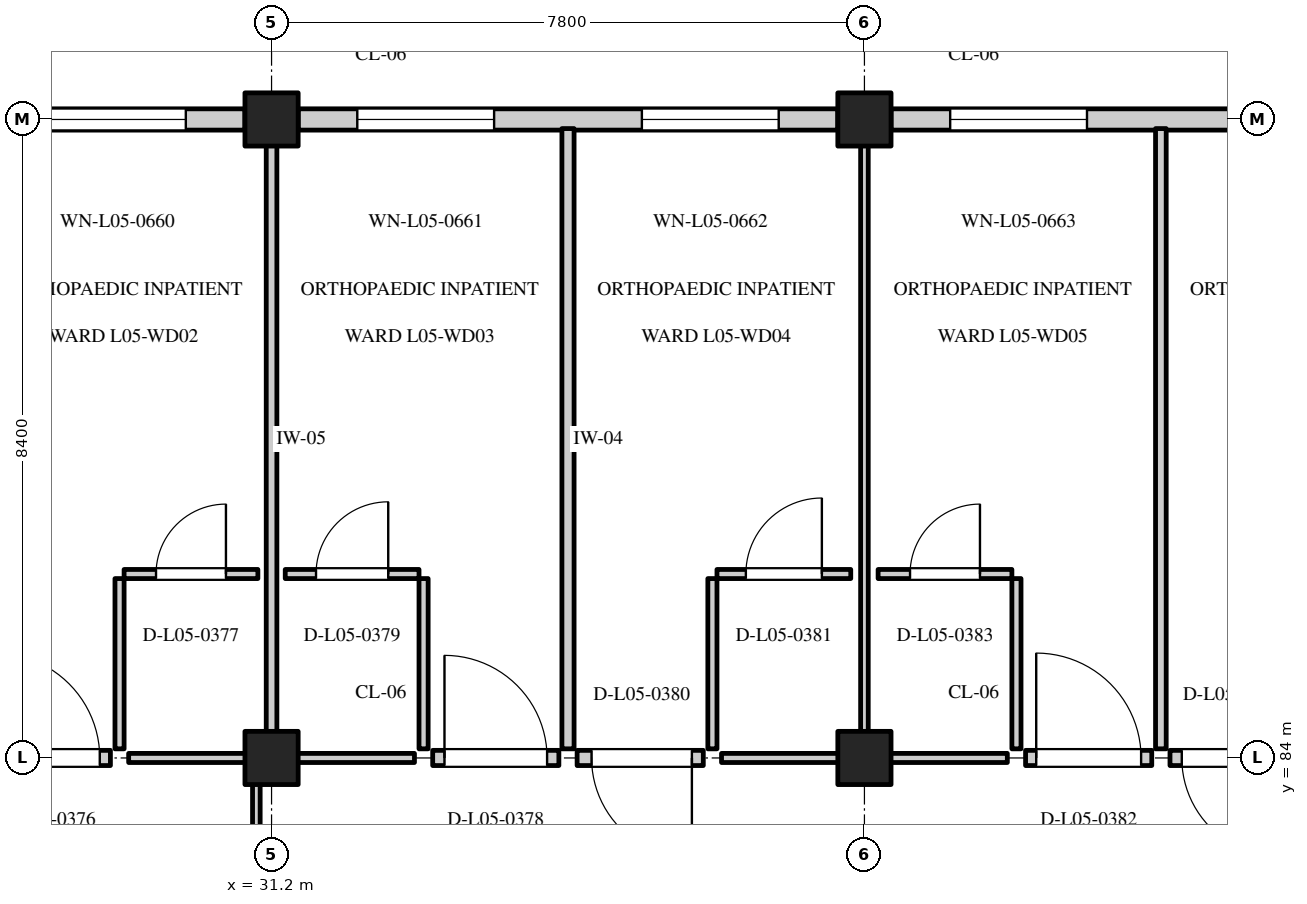
"""IFC4 building model, lengths in metres.
Left out: names, types, materials, properties, quantities, classifications, styles, units other than length and angle.
Written with IfcOpenShell. Run it as: python <this file> out.ifc"""

import sys

from ifc_helpers import new_model, si_unit, direction, frame, frame_2d, origin, origin_2d, place, context, subcontext, project, spatial, rectangle, extrude, element, fill, save


model = new_model("IFC4")
c1 = context("Model", 3, precision=1e-05, world=origin(), true_north=direction((0.0, 1.0)))
c2 = subcontext(c1, "Body", "Model", "MODEL_VIEW")
j1 = project(units=[si_unit("LENGTHUNIT", "METRE"), si_unit("PLANEANGLEUNIT", "RADIAN")], contexts=[c1])
p1 = place(None, origin())
s1 = spatial("IfcSite", under=j1, at=p1, CompositionType="ELEMENT")
p2 = place(p1, origin())
s2 = spatial("IfcBuilding", under=s1, at=p2, CompositionType="ELEMENT")
p3 = place(p2, frame((0.0, 0.0, 22.2)))
s3 = spatial("IfcBuildingStorey", under=s2, at=p3, CompositionType="ELEMENT", Elevation=22.2)
for number, where, z_axis, x_axis in (
    (1, (31.2, 84.0, 0.0), (0.0, 0.0, 1.0), (1.0, 0.0, 0.0)),
    (2, (31.2, 92.4, 0.0), (0.0, 0.0, 1.0), (1.0, 0.0, 0.0)),
    (3, (39.0, 84.0, 0.0), (0.0, 0.0, 1.0), (1.0, 0.0, 0.0)),
    (4, (39.0, 92.4, 0.0), (0.0, 0.0, 1.0), (1.0, 0.0, 0.0)),
):
    element("IfcColumn", number, at=place(p3, frame(where, z_axis=z_axis, x_axis=x_axis)), inside=s3, PredefinedType="COLUMN", context=c2, shape_type="SweptSolid", body=[
        extrude(rectangle(XDim=0.7, YDim=0.7, at=origin_2d()), origin(), (0.0, 0.0, 1.0), 3.9),
    ])
p4 = place(p3, frame((23.775, 92.4, 0.0), z_axis=(0.0, 0.0, 1.0), x_axis=(1.0, 0.0, 0.0)))
e5 = element("IfcWall", 5, at=p4, inside=s3, PredefinedType="STANDARD", context=c2, shape_type="SweptSolid", body=[
    extrude(rectangle(XDim=7.075, YDim=0.28, at=frame_2d((3.538, 0.0))), origin(), (0.0, 0.0, 1.0), 3.05),
])
p5 = place(p4, frame((0.753, 0.0, 0.8)))
e6 = element("IfcOpeningElement", 6, at=p5, cuts=e5, PredefinedType="OPENING", context=c2, shape_type="SweptSolid", body=[
    extrude(rectangle(XDim=1.8, YDim=1.75, at=frame_2d((0.9, 0.875))), frame((0.0, 0.152, 0.0), z_axis=(0.0, -1.0, 0.0), x_axis=(1.0, 0.0, 0.0)), (0.0, 0.0, 1.0), 0.304),
])
p6 = place(p4, frame((4.497, 0.0, 0.8)))
e7 = element("IfcOpeningElement", 7, at=p6, cuts=e5, PredefinedType="OPENING", context=c2, shape_type="SweptSolid", body=[
    extrude(rectangle(XDim=1.8, YDim=1.75, at=frame_2d((0.9, 0.875))), frame((0.0, 0.152, 0.0), z_axis=(0.0, -1.0, 0.0), x_axis=(1.0, 0.0, 0.0)), (0.0, 0.0, 1.0), 0.304),
])
p7 = place(p3, frame((31.55, 92.4, 0.0), z_axis=(0.0, 0.0, 1.0), x_axis=(1.0, 0.0, 0.0)))
e8 = element("IfcWall", 8, at=p7, inside=s3, PredefinedType="STANDARD", context=c2, shape_type="SweptSolid", body=[
    extrude(rectangle(XDim=7.1, YDim=0.28, at=frame_2d((3.55, 0.0))), origin(), (0.0, 0.0, 1.0), 3.05),
])
p8 = place(p7, frame((0.778, 0.0, 0.8)))
e9 = element("IfcOpeningElement", 9, at=p8, cuts=e8, PredefinedType="OPENING", context=c2, shape_type="SweptSolid", body=[
    extrude(rectangle(XDim=1.8, YDim=1.65, at=frame_2d((0.9, 0.825))), frame((0.0, 0.152, 0.0), z_axis=(0.0, -1.0, 0.0), x_axis=(1.0, 0.0, 0.0)), (0.0, 0.0, 1.0), 0.304),
])
p9 = place(p7, frame((4.522, 0.0, 0.8)))
e10 = element("IfcOpeningElement", 10, at=p9, cuts=e8, PredefinedType="OPENING", context=c2, shape_type="SweptSolid", body=[
    extrude(rectangle(XDim=1.8, YDim=1.65, at=frame_2d((0.9, 0.825))), frame((0.0, 0.152, 0.0), z_axis=(0.0, -1.0, 0.0), x_axis=(1.0, 0.0, 0.0)), (0.0, 0.0, 1.0), 0.304),
])
p10 = place(p3, frame((39.35, 92.4, 0.0), z_axis=(0.0, 0.0, 1.0), x_axis=(1.0, 0.0, 0.0)))
e11 = element("IfcWall", 11, at=p10, inside=s3, PredefinedType="STANDARD", context=c2, shape_type="SweptSolid", body=[
    extrude(rectangle(XDim=7.1, YDim=0.28, at=frame_2d((3.55, 0.0))), origin(), (0.0, 0.0, 1.0), 3.05),
])
p11 = place(p10, frame((0.778, 0.0, 0.8)))
e12 = element("IfcOpeningElement", 12, at=p11, cuts=e11, PredefinedType="OPENING", context=c2, shape_type="SweptSolid", body=[
    extrude(rectangle(XDim=1.8, YDim=1.55, at=frame_2d((0.9, 0.775))), frame((0.0, 0.152, 0.0), z_axis=(0.0, -1.0, 0.0), x_axis=(1.0, 0.0, 0.0)), (0.0, 0.0, 1.0), 0.304),
])
p12 = place(p10, frame((4.522, 0.0, 0.8)))
e13 = element("IfcOpeningElement", 13, at=p12, cuts=e11, PredefinedType="OPENING", context=c2, shape_type="SweptSolid", body=[
    extrude(rectangle(XDim=1.8, YDim=1.55, at=frame_2d((0.9, 0.775))), frame((0.0, 0.152, 0.0), z_axis=(0.0, -1.0, 0.0), x_axis=(1.0, 0.0, 0.0)), (0.0, 0.0, 1.0), 0.304),
])
p13 = place(p3, frame((31.2, 84.12, 0.0), z_axis=(0.0, 0.0, 1.0), x_axis=(0.0, 1.0, 0.0)))
e14 = element("IfcWall", 14, at=p13, inside=s3, PredefinedType="PARTITIONING", context=c2, shape_type="SweptSolid", body=[
    extrude(rectangle(XDim=8.16, YDim=0.14, at=frame_2d((4.08, 0.0))), origin(), (0.0, 0.0, 1.0), 3.58),
])
p14 = place(p3, frame((27.42, 84.0, 0.0), z_axis=(0.0, 0.0, 1.0), x_axis=(1.0, 0.0, 0.0)))
e15 = element("IfcWall", 15, at=p14, inside=s3, PredefinedType="STANDARD", context=c2, shape_type="SweptSolid", body=[
    extrude(rectangle(XDim=1.66, YDim=0.2, at=frame_2d((0.83, 0.0))), origin(), (0.0, 0.0, 1.0), 2.95),
])
p15 = place(p14, frame((0.14, 0.0, 0.0)))
e16 = element("IfcOpeningElement", 16, at=p15, cuts=e15, PredefinedType="OPENING", context=c2, shape_type="SweptSolid", body=[
    extrude(rectangle(XDim=1.38, YDim=2.2, at=frame_2d((0.69, 1.1))), frame((0.0, 0.112, 0.0), z_axis=(0.0, -1.0, 0.0), x_axis=(1.0, 0.0, 0.0)), (0.0, 0.0, 1.0), 0.224),
])
p16 = place(p3, frame((29.32, 84.0, 0.0), z_axis=(0.0, 0.0, 1.0), x_axis=(1.0, 0.0, 0.0)))
e17 = element("IfcWall", 17, at=p16, inside=s3, PredefinedType="PARTITIONING", context=c2, shape_type="SweptSolid", body=[
    extrude(rectangle(XDim=1.76, YDim=0.12, at=frame_2d((0.88, 0.0))), origin(), (0.0, 0.0, 1.0), 2.95),
])
p17 = place(p3, frame((29.2, 84.12, 0.0), z_axis=(0.0, 0.0, 1.0), x_axis=(0.0, 1.0, 0.0)))
e18 = element("IfcWall", 18, at=p17, inside=s3, PredefinedType="PARTITIONING", context=c2, shape_type="SweptSolid", body=[
    extrude(rectangle(XDim=2.24, YDim=0.12, at=frame_2d((1.12, 0.0))), origin(), (0.0, 0.0, 1.0), 3.58),
])
p18 = place(p3, frame((29.26, 86.42, 0.0), z_axis=(0.0, 0.0, 1.0), x_axis=(1.0, 0.0, 0.0)))
e19 = element("IfcWall", 19, at=p18, inside=s3, PredefinedType="PARTITIONING", context=c2, shape_type="SweptSolid", body=[
    extrude(rectangle(XDim=1.76, YDim=0.12, at=frame_2d((0.88, 0.0))), origin(), (0.0, 0.0, 1.0), 3.58),
])
p19 = place(p18, frame((0.42, 0.0, 0.0)))
e20 = element("IfcOpeningElement", 20, at=p19, cuts=e19, PredefinedType="OPENING", context=c2, shape_type="SweptSolid", body=[
    extrude(rectangle(XDim=0.92, YDim=2.08, at=frame_2d((0.46, 1.04))), frame((0.0, 0.072, 0.0), z_axis=(0.0, -1.0, 0.0), x_axis=(1.0, 0.0, 0.0)), (0.0, 0.0, 1.0), 0.144),
])
p20 = place(p3, frame((35.1, 84.12, 0.0), z_axis=(0.0, 0.0, 1.0), x_axis=(0.0, 1.0, 0.0)))
e21 = element("IfcWall", 21, at=p20, inside=s3, PredefinedType="PARTITIONING", context=c2, shape_type="SweptSolid", body=[
    extrude(rectangle(XDim=8.16, YDim=0.16, at=frame_2d((4.08, 0.0))), origin(), (0.0, 0.0, 1.0), 3.58),
])
p21 = place(p3, frame((33.32, 84.0, 0.0), z_axis=(0.0, 0.0, 1.0), x_axis=(1.0, 0.0, 0.0)))
e22 = element("IfcWall", 22, at=p21, inside=s3, PredefinedType="STANDARD", context=c2, shape_type="SweptSolid", body=[
    extrude(rectangle(XDim=1.66, YDim=0.2, at=frame_2d((0.83, 0.0))), origin(), (0.0, 0.0, 1.0), 2.95),
])
p22 = place(p21, frame((0.155, 0.0, 0.0)))
e23 = element("IfcOpeningElement", 23, at=p22, cuts=e22, PredefinedType="OPENING", context=c2, shape_type="SweptSolid", body=[
    extrude(rectangle(XDim=1.35, YDim=2.15, at=frame_2d((0.675, 1.075))), frame((0.0, 0.112, 0.0), z_axis=(0.0, -1.0, 0.0), x_axis=(1.0, 0.0, 0.0)), (0.0, 0.0, 1.0), 0.224),
])
p23 = place(p3, frame((31.32, 84.0, 0.0), z_axis=(0.0, 0.0, 1.0), x_axis=(1.0, 0.0, 0.0)))
e24 = element("IfcWall", 24, at=p23, inside=s3, PredefinedType="PARTITIONING", context=c2, shape_type="SweptSolid", body=[
    extrude(rectangle(XDim=1.76, YDim=0.12, at=frame_2d((0.88, 0.0))), origin(), (0.0, 0.0, 1.0), 2.95),
])
p24 = place(p3, frame((33.2, 84.12, 0.0), z_axis=(0.0, 0.0, 1.0), x_axis=(0.0, 1.0, 0.0)))
e25 = element("IfcWall", 25, at=p24, inside=s3, PredefinedType="PARTITIONING", context=c2, shape_type="SweptSolid", body=[
    extrude(rectangle(XDim=2.24, YDim=0.12, at=frame_2d((1.12, 0.0))), origin(), (0.0, 0.0, 1.0), 3.58),
])
p25 = place(p3, frame((31.38, 86.42, 0.0), z_axis=(0.0, 0.0, 1.0), x_axis=(1.0, 0.0, 0.0)))
e26 = element("IfcWall", 26, at=p25, inside=s3, PredefinedType="PARTITIONING", context=c2, shape_type="SweptSolid", body=[
    extrude(rectangle(XDim=1.76, YDim=0.12, at=frame_2d((0.88, 0.0))), origin(), (0.0, 0.0, 1.0), 3.58),
])
p26 = place(p25, frame((0.405, 0.0, 0.0)))
e27 = element("IfcOpeningElement", 27, at=p26, cuts=e26, PredefinedType="OPENING", context=c2, shape_type="SweptSolid", body=[
    extrude(rectangle(XDim=0.95, YDim=2.1, at=frame_2d((0.475, 1.05))), frame((0.0, 0.072, 0.0), z_axis=(0.0, -1.0, 0.0), x_axis=(1.0, 0.0, 0.0)), (0.0, 0.0, 1.0), 0.144),
])
p27 = place(p3, frame((39.0, 84.12, 0.0), z_axis=(0.0, 0.0, 1.0), x_axis=(0.0, 1.0, 0.0)))
e28 = element("IfcWall", 28, at=p27, inside=s3, PredefinedType="PARTITIONING", context=c2, shape_type="SweptSolid", body=[
    extrude(rectangle(XDim=8.16, YDim=0.1, at=frame_2d((4.08, 0.0))), origin(), (0.0, 0.0, 1.0), 2.95),
])
p28 = place(p3, frame((35.22, 84.0, 0.0), z_axis=(0.0, 0.0, 1.0), x_axis=(1.0, 0.0, 0.0)))
e29 = element("IfcWall", 29, at=p28, inside=s3, PredefinedType="STANDARD", context=c2, shape_type="SweptSolid", body=[
    extrude(rectangle(XDim=1.66, YDim=0.2, at=frame_2d((0.83, 0.0))), origin(), (0.0, 0.0, 1.0), 2.95),
])
p29 = place(p28, frame((0.19, 0.0, 0.0)))
e30 = element("IfcOpeningElement", 30, at=p29, cuts=e29, PredefinedType="OPENING", context=c2, shape_type="SweptSolid", body=[
    extrude(rectangle(XDim=1.32, YDim=2.2, at=frame_2d((0.66, 1.1))), frame((0.0, 0.112, 0.0), z_axis=(0.0, -1.0, 0.0), x_axis=(1.0, 0.0, 0.0)), (0.0, 0.0, 1.0), 0.224),
])
p30 = place(p3, frame((37.12, 84.0, 0.0), z_axis=(0.0, 0.0, 1.0), x_axis=(1.0, 0.0, 0.0)))
e31 = element("IfcWall", 31, at=p30, inside=s3, PredefinedType="PARTITIONING", context=c2, shape_type="SweptSolid", body=[
    extrude(rectangle(XDim=1.76, YDim=0.12, at=frame_2d((0.88, 0.0))), origin(), (0.0, 0.0, 1.0), 2.95),
])
p31 = place(p3, frame((37.0, 84.12, 0.0), z_axis=(0.0, 0.0, 1.0), x_axis=(0.0, 1.0, 0.0)))
e32 = element("IfcWall", 32, at=p31, inside=s3, PredefinedType="PARTITIONING", context=c2, shape_type="SweptSolid", body=[
    extrude(rectangle(XDim=2.24, YDim=0.12, at=frame_2d((1.12, 0.0))), origin(), (0.0, 0.0, 1.0), 3.58),
])
p32 = place(p3, frame((37.06, 86.42, 0.0), z_axis=(0.0, 0.0, 1.0), x_axis=(1.0, 0.0, 0.0)))
e33 = element("IfcWall", 33, at=p32, inside=s3, PredefinedType="PARTITIONING", context=c2, shape_type="SweptSolid", body=[
    extrude(rectangle(XDim=1.76, YDim=0.12, at=frame_2d((0.88, 0.0))), origin(), (0.0, 0.0, 1.0), 3.58),
])
p33 = place(p32, frame((0.38, 0.0, 0.0)))
e34 = element("IfcOpeningElement", 34, at=p33, cuts=e33, PredefinedType="OPENING", context=c2, shape_type="SweptSolid", body=[
    extrude(rectangle(XDim=1.0, YDim=2.1, at=frame_2d((0.5, 1.05))), frame((0.0, 0.072, 0.0), z_axis=(0.0, -1.0, 0.0), x_axis=(1.0, 0.0, 0.0)), (0.0, 0.0, 1.0), 0.144),
])
p34 = place(p3, frame((42.9, 84.12, 0.0), z_axis=(0.0, 0.0, 1.0), x_axis=(0.0, 1.0, 0.0)))
e35 = element("IfcWall", 35, at=p34, inside=s3, PredefinedType="PARTITIONING", context=c2, shape_type="SweptSolid", body=[
    extrude(rectangle(XDim=8.16, YDim=0.14, at=frame_2d((4.08, 0.0))), origin(), (0.0, 0.0, 1.0), 3.58),
])
p35 = place(p3, frame((41.12, 84.0, 0.0), z_axis=(0.0, 0.0, 1.0), x_axis=(1.0, 0.0, 0.0)))
e36 = element("IfcWall", 36, at=p35, inside=s3, PredefinedType="STANDARD", context=c2, shape_type="SweptSolid", body=[
    extrude(rectangle(XDim=1.66, YDim=0.2, at=frame_2d((0.83, 0.0))), origin(), (0.0, 0.0, 1.0), 2.95),
])
p36 = place(p35, frame((0.14, 0.0, 0.0)))
e37 = element("IfcOpeningElement", 37, at=p36, cuts=e36, PredefinedType="OPENING", context=c2, shape_type="SweptSolid", body=[
    extrude(rectangle(XDim=1.38, YDim=2.2, at=frame_2d((0.69, 1.1))), frame((0.0, 0.112, 0.0), z_axis=(0.0, -1.0, 0.0), x_axis=(1.0, 0.0, 0.0)), (0.0, 0.0, 1.0), 0.224),
])
p37 = place(p3, frame((39.12, 84.0, 0.0), z_axis=(0.0, 0.0, 1.0), x_axis=(1.0, 0.0, 0.0)))
e38 = element("IfcWall", 38, at=p37, inside=s3, PredefinedType="PARTITIONING", context=c2, shape_type="SweptSolid", body=[
    extrude(rectangle(XDim=1.76, YDim=0.12, at=frame_2d((0.88, 0.0))), origin(), (0.0, 0.0, 1.0), 2.95),
])
p38 = place(p3, frame((41.0, 84.12, 0.0), z_axis=(0.0, 0.0, 1.0), x_axis=(0.0, 1.0, 0.0)))
e39 = element("IfcWall", 39, at=p38, inside=s3, PredefinedType="PARTITIONING", context=c2, shape_type="SweptSolid", body=[
    extrude(rectangle(XDim=2.24, YDim=0.12, at=frame_2d((1.12, 0.0))), origin(), (0.0, 0.0, 1.0), 3.58),
])
p39 = place(p3, frame((39.18, 86.42, 0.0), z_axis=(0.0, 0.0, 1.0), x_axis=(1.0, 0.0, 0.0)))
e40 = element("IfcWall", 40, at=p39, inside=s3, PredefinedType="PARTITIONING", context=c2, shape_type="SweptSolid", body=[
    extrude(rectangle(XDim=1.76, YDim=0.12, at=frame_2d((0.88, 0.0))), origin(), (0.0, 0.0, 1.0), 3.58),
])
p40 = place(p39, frame((0.42, 0.0, 0.0)))
e41 = element("IfcOpeningElement", 41, at=p40, cuts=e40, PredefinedType="OPENING", context=c2, shape_type="SweptSolid", body=[
    extrude(rectangle(XDim=0.92, YDim=2.08, at=frame_2d((0.46, 1.04))), frame((0.0, 0.072, 0.0), z_axis=(0.0, -1.0, 0.0), x_axis=(1.0, 0.0, 0.0)), (0.0, 0.0, 1.0), 0.144),
])
p41 = place(p3, frame((43.02, 84.0, 0.0), z_axis=(0.0, 0.0, 1.0), x_axis=(1.0, 0.0, 0.0)))
e42 = element("IfcWall", 42, at=p41, inside=s3, PredefinedType="STANDARD", context=c2, shape_type="SweptSolid", body=[
    extrude(rectangle(XDim=1.66, YDim=0.2, at=frame_2d((0.83, 0.0))), origin(), (0.0, 0.0, 1.0), 2.95),
])
p42 = place(p41, frame((0.155, 0.0, 0.0)))
e43 = element("IfcOpeningElement", 43, at=p42, cuts=e42, PredefinedType="OPENING", context=c2, shape_type="SweptSolid", body=[
    extrude(rectangle(XDim=1.3, YDim=2.15, at=frame_2d((0.65, 1.075))), frame((0.0, 0.112, 0.0), z_axis=(0.0, -1.0, 0.0), x_axis=(1.0, 0.0, 0.0)), (0.0, 0.0, 1.0), 0.224),
])
p43 = place(p3, frame((31.0, 75.885, 0.0), z_axis=(0.0, 0.0, 1.0), x_axis=(0.0, 1.0, 0.0)))
e44 = element("IfcWall", 44, at=p43, inside=s3, PredefinedType="PARTITIONING", context=c2, shape_type="SweptSolid", body=[
    extrude(rectangle(XDim=8.18, YDim=0.1, at=frame_2d((4.09, 0.0))), origin(), (0.0, 0.0, 1.0), 3.58),
])
p44 = place(p43, frame((2.296, 0.0, 0.0)))
e45 = element("IfcOpeningElement", 45, at=p44, cuts=e44, PredefinedType="OPENING", context=c2, shape_type="SweptSolid", body=[
    extrude(rectangle(XDim=1.2, YDim=2.15, at=frame_2d((0.6, 1.075))), frame((0.0, 0.062, 0.0), z_axis=(0.0, -1.0, 0.0), x_axis=(1.0, 0.0, 0.0)), (0.0, 0.0, 1.0), 0.124),
])
p45 = place(p6, origin())
e46 = element("IfcWindow", 46, at=p45, inside=s3, PartitioningType="DOUBLE_PANEL_VERTICAL", PredefinedType="WINDOW", context=c2, shape_type="SweptSolid", body=[
    extrude(rectangle(XDim=1.8, YDim=1.75, at=frame_2d((0.9, 0.875))), frame((0.0, 0.03, 0.0), z_axis=(0.0, -1.0, 0.0), x_axis=(1.0, 0.0, 0.0)), (0.0, 0.0, 1.0), 0.06),
])
fill(e7, e46)
p46 = place(p8, origin())
e47 = element("IfcWindow", 47, at=p46, inside=s3, PartitioningType="DOUBLE_PANEL_VERTICAL", PredefinedType="WINDOW", context=c2, shape_type="SweptSolid", body=[
    extrude(rectangle(XDim=1.8, YDim=1.65, at=frame_2d((0.9, 0.825))), frame((0.0, 0.03, 0.0), z_axis=(0.0, -1.0, 0.0), x_axis=(1.0, 0.0, 0.0)), (0.0, 0.0, 1.0), 0.06),
])
fill(e9, e47)
p47 = place(p9, origin())
e48 = element("IfcWindow", 48, at=p47, inside=s3, PartitioningType="DOUBLE_PANEL_VERTICAL", PredefinedType="WINDOW", context=c2, shape_type="SweptSolid", body=[
    extrude(rectangle(XDim=1.8, YDim=1.65, at=frame_2d((0.9, 0.825))), frame((0.0, 0.03, 0.0), z_axis=(0.0, -1.0, 0.0), x_axis=(1.0, 0.0, 0.0)), (0.0, 0.0, 1.0), 0.06),
])
fill(e10, e48)
p48 = place(p11, origin())
e49 = element("IfcWindow", 49, at=p48, inside=s3, PartitioningType="DOUBLE_PANEL_VERTICAL", PredefinedType="WINDOW", context=c2, shape_type="SweptSolid", body=[
    extrude(rectangle(XDim=1.8, YDim=1.55, at=frame_2d((0.9, 0.775))), frame((0.0, 0.03, 0.0), z_axis=(0.0, -1.0, 0.0), x_axis=(1.0, 0.0, 0.0)), (0.0, 0.0, 1.0), 0.06),
])
fill(e12, e49)
p49 = place(p15, origin())
e50 = element("IfcDoor", 50, at=p49, inside=s3, OperationType="SINGLE_SWING_LEFT", PredefinedType="DOOR", context=c2, shape_type="SweptSolid", body=[
    extrude(rectangle(XDim=1.38, YDim=2.2, at=frame_2d((0.69, 1.1))), frame((0.0, 0.025, 0.0), z_axis=(0.0, -1.0, 0.0), x_axis=(1.0, 0.0, 0.0)), (0.0, 0.0, 1.0), 0.05),
])
fill(e16, e50)
p50 = place(p19, frame((0.92, 0.0, 0.0), z_axis=(0.0, 0.0, 1.0), x_axis=(-1.0, 0.0, 0.0)))
e51 = element("IfcDoor", 51, at=p50, inside=s3, OperationType="SINGLE_SWING_LEFT", PredefinedType="DOOR", context=c2, shape_type="SweptSolid", body=[
    extrude(rectangle(XDim=0.92, YDim=2.08, at=frame_2d((0.46, 1.04))), frame((0.0, 0.025, 0.0), z_axis=(0.0, -1.0, 0.0), x_axis=(1.0, 0.0, 0.0)), (0.0, 0.0, 1.0), 0.05),
])
fill(e20, e51)
p51 = place(p22, origin())
e52 = element("IfcDoor", 52, at=p51, inside=s3, OperationType="SINGLE_SWING_LEFT", PredefinedType="DOOR", context=c2, shape_type="SweptSolid", body=[
    extrude(rectangle(XDim=1.35, YDim=2.15, at=frame_2d((0.675, 1.075))), frame((0.0, 0.025, 0.0), z_axis=(0.0, -1.0, 0.0), x_axis=(1.0, 0.0, 0.0)), (0.0, 0.0, 1.0), 0.05),
])
fill(e23, e52)
p52 = place(p26, frame((0.95, 0.0, 0.0), z_axis=(0.0, 0.0, 1.0), x_axis=(-1.0, 0.0, 0.0)))
e53 = element("IfcDoor", 53, at=p52, inside=s3, OperationType="SINGLE_SWING_LEFT", PredefinedType="DOOR", context=c2, shape_type="SweptSolid", body=[
    extrude(rectangle(XDim=0.95, YDim=2.1, at=frame_2d((0.475, 1.05))), frame((0.0, 0.025, 0.0), z_axis=(0.0, -1.0, 0.0), x_axis=(1.0, 0.0, 0.0)), (0.0, 0.0, 1.0), 0.05),
])
fill(e27, e53)
p53 = place(p29, origin())
e54 = element("IfcDoor", 54, at=p53, inside=s3, OperationType="SINGLE_SWING_RIGHT", PredefinedType="DOOR", context=c2, shape_type="SweptSolid", body=[
    extrude(rectangle(XDim=1.32, YDim=2.2, at=frame_2d((0.66, 1.1))), frame((0.0, 0.025, 0.0), z_axis=(0.0, -1.0, 0.0), x_axis=(1.0, 0.0, 0.0)), (0.0, 0.0, 1.0), 0.05),
])
fill(e30, e54)
p54 = place(p33, frame((1.0, 0.0, 0.0), z_axis=(0.0, 0.0, 1.0), x_axis=(-1.0, 0.0, 0.0)))
e55 = element("IfcDoor", 55, at=p54, inside=s3, OperationType="SINGLE_SWING_LEFT", PredefinedType="DOOR", context=c2, shape_type="SweptSolid", body=[
    extrude(rectangle(XDim=1.0, YDim=2.1, at=frame_2d((0.5, 1.05))), frame((0.0, 0.025, 0.0), z_axis=(0.0, -1.0, 0.0), x_axis=(1.0, 0.0, 0.0)), (0.0, 0.0, 1.0), 0.05),
])
fill(e34, e55)
p55 = place(p36, origin())
e56 = element("IfcDoor", 56, at=p55, inside=s3, OperationType="SINGLE_SWING_LEFT", PredefinedType="DOOR", context=c2, shape_type="SweptSolid", body=[
    extrude(rectangle(XDim=1.38, YDim=2.2, at=frame_2d((0.69, 1.1))), frame((0.0, 0.025, 0.0), z_axis=(0.0, -1.0, 0.0), x_axis=(1.0, 0.0, 0.0)), (0.0, 0.0, 1.0), 0.05),
])
fill(e37, e56)
p56 = place(p40, frame((0.92, 0.0, 0.0), z_axis=(0.0, 0.0, 1.0), x_axis=(-1.0, 0.0, 0.0)))
e57 = element("IfcDoor", 57, at=p56, inside=s3, OperationType="SINGLE_SWING_LEFT", PredefinedType="DOOR", context=c2, shape_type="SweptSolid", body=[
    extrude(rectangle(XDim=0.92, YDim=2.08, at=frame_2d((0.46, 1.04))), frame((0.0, 0.025, 0.0), z_axis=(0.0, -1.0, 0.0), x_axis=(1.0, 0.0, 0.0)), (0.0, 0.0, 1.0), 0.05),
])
fill(e41, e57)
p57 = place(p42, origin())
e58 = element("IfcDoor", 58, at=p57, inside=s3, OperationType="SINGLE_SWING_RIGHT", PredefinedType="DOOR", context=c2, shape_type="SweptSolid", body=[
    extrude(rectangle(XDim=1.3, YDim=2.15, at=frame_2d((0.65, 1.075))), frame((0.0, 0.025, 0.0), z_axis=(0.0, -1.0, 0.0), x_axis=(1.0, 0.0, 0.0)), (0.0, 0.0, 1.0), 0.05),
])
fill(e43, e58)
save(model, sys.argv[1])
